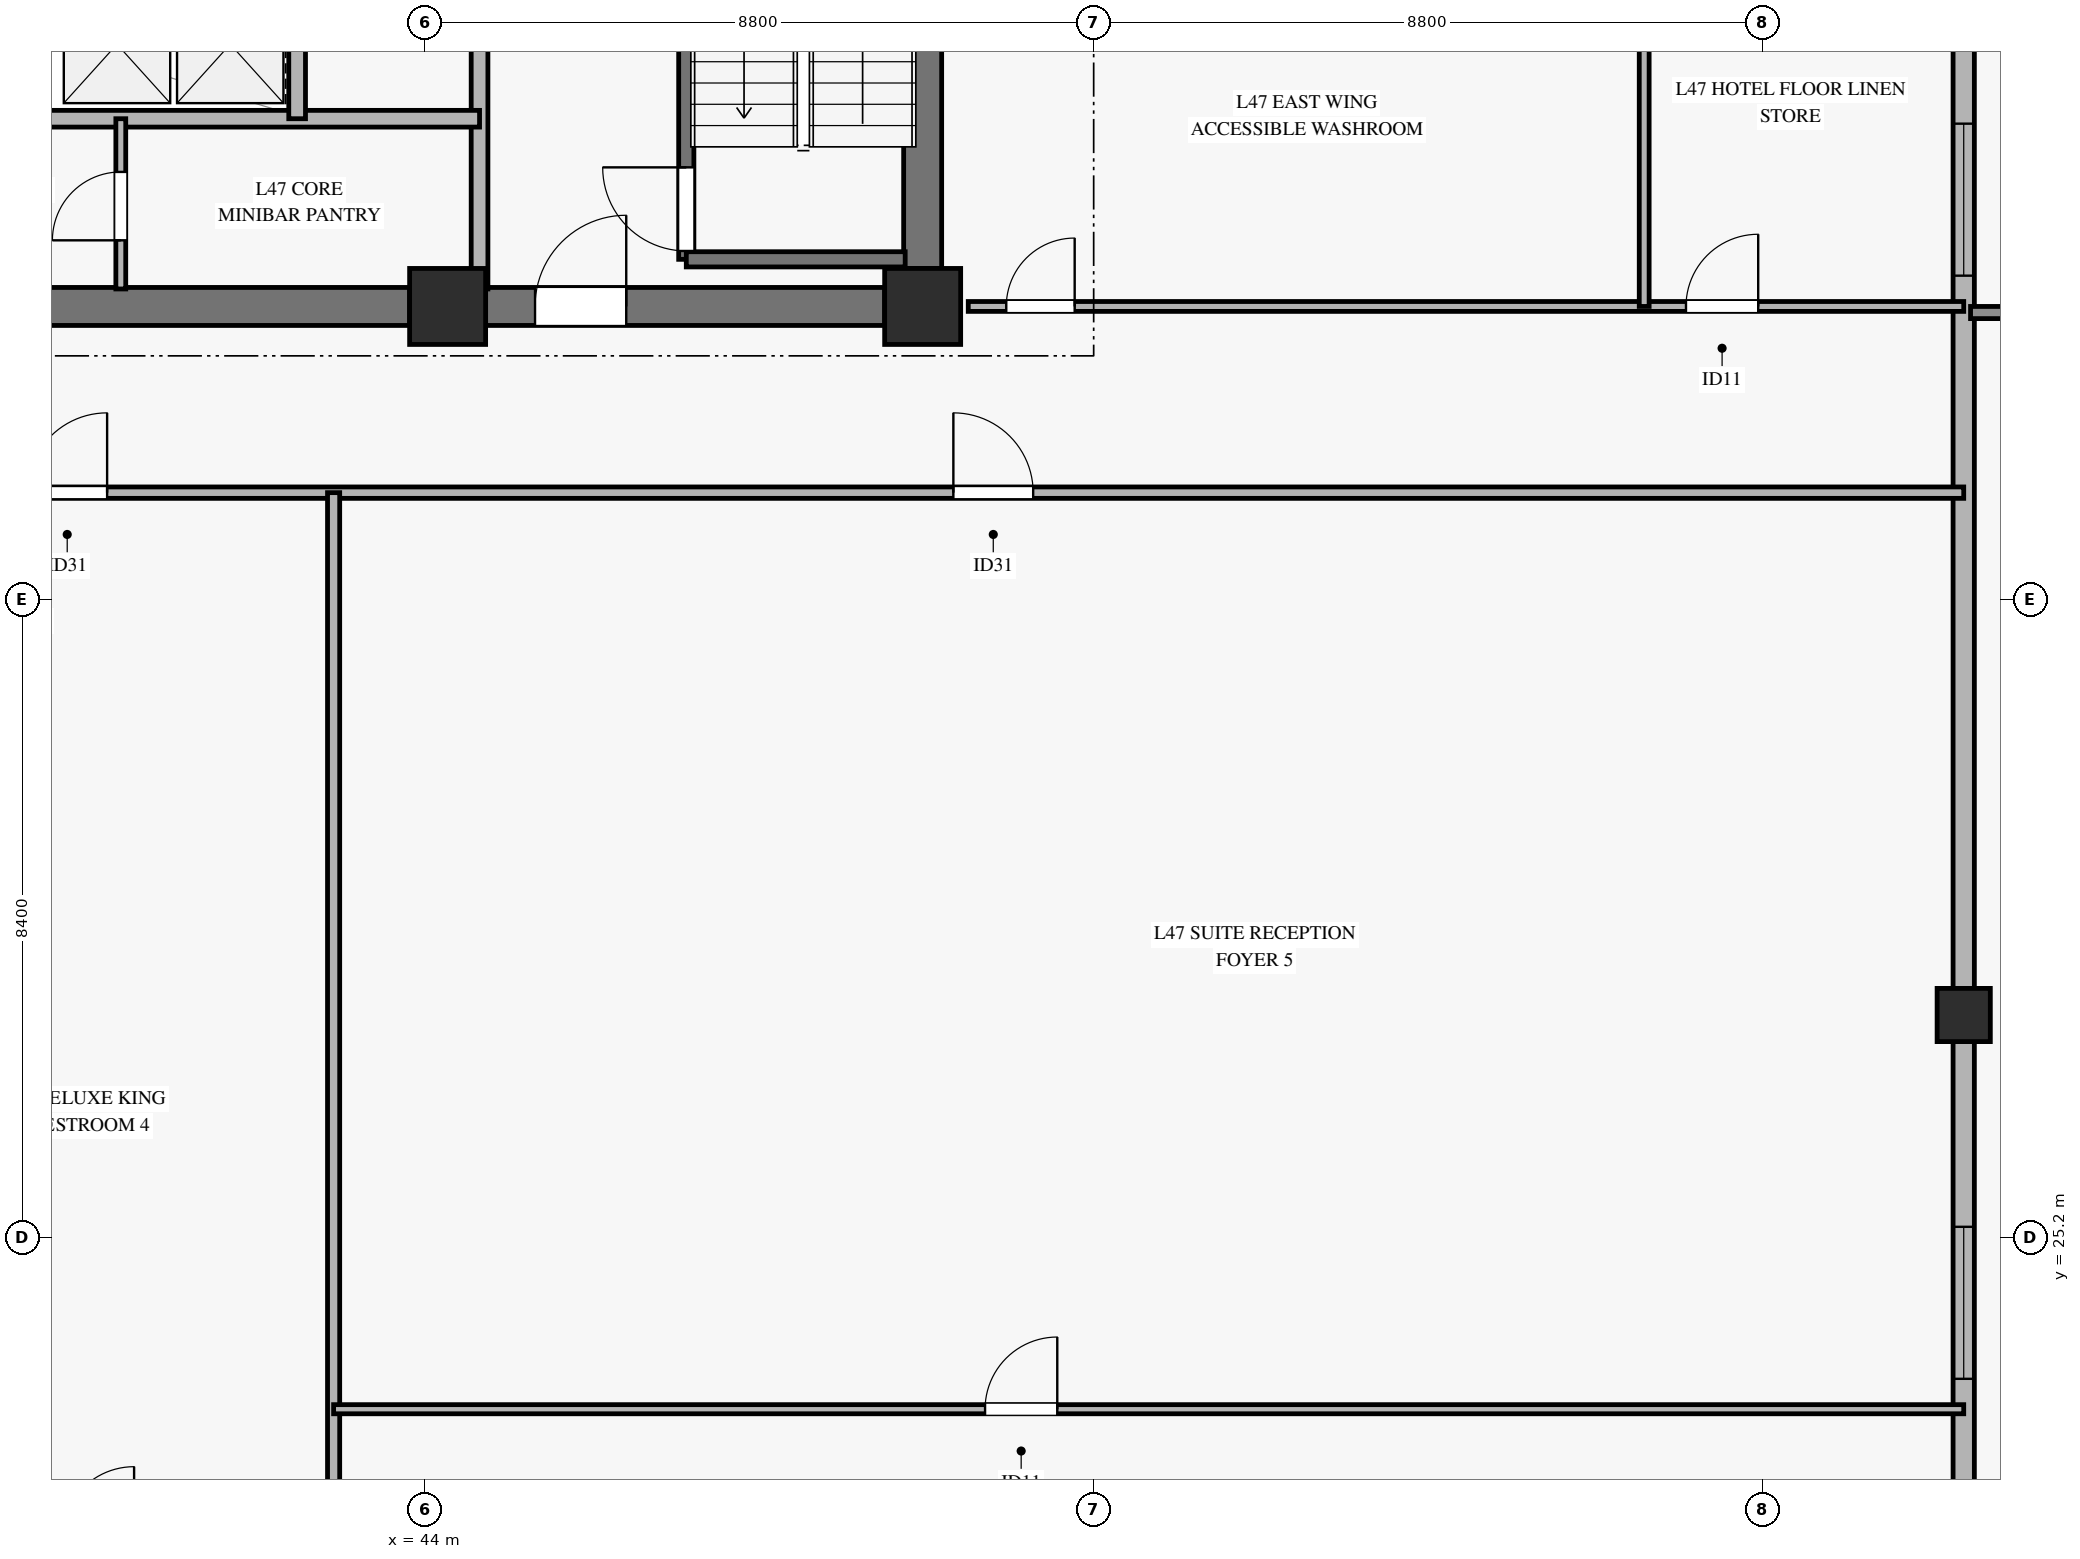
"""IFC4 building model, lengths in metres.
Left out: names, types, materials, properties, quantities, classifications, styles, units other than length and angle.
Written with IfcOpenShell. Run it as: python <this file> out.ifc"""

import sys

from ifc_helpers import new_model, si_unit, direction, frame, frame_2d, origin, origin_2d, place, context, subcontext, project, spatial, rectangle, hollow_rectangle, extrude, source, transform, mapped, element, fill, save


model = new_model("IFC4")
c1 = context("Model", 3, precision=1e-05, world=origin(), true_north=direction((0.0, 1.0)))
c2 = subcontext(c1, "Body", "Model", "MODEL_VIEW")
j1 = project(units=[si_unit("LENGTHUNIT", "METRE"), si_unit("PLANEANGLEUNIT", "RADIAN")], contexts=[c1])
p1 = place(None, origin())
s1 = spatial("IfcSite", under=j1, at=p1, CompositionType="ELEMENT")
p2 = place(p1, origin())
s2 = spatial("IfcBuilding", under=s1, at=p2, CompositionType="ELEMENT")
p3 = place(p2, frame((0.0, 0.0, 187.7)))
s3 = spatial("IfcBuildingStorey", under=s2, at=p3, CompositionType="ELEMENT", Elevation=187.7)
m1 = source(origin(), c2, "Body", "SweptSolid", [
    extrude(rectangle(XDim=1.0, YDim=1.0, at=origin_2d()), origin(), (0.0, 0.0, 1.0), 3.22),
])
for number, where, z_axis, x_axis in (
    (1, (44.3, 37.45, 0.0), (0.0, 0.0, 1.0), (1.0, 0.0, 0.0)),
    (2, (50.55, 37.45, 0.0), (0.0, 0.0, 1.0), (1.0, 0.0, 0.0)),
):
    element("IfcColumn", number, at=place(p3, frame(where, z_axis=z_axis, x_axis=x_axis)), inside=s3, PredefinedType="PILASTER", context=c2, shape_type="MappedRepresentation", body=[
        mapped(m1, transform((0.0, 0.0, 0.0), x_axis=(1.0, 0.0, 0.0), y_axis=(0.0, 1.0, 0.0), z_axis=(0.0, 0.0, 1.0), scale=1.0)),
    ])
p4 = place(p3, frame((36.1, 37.45, 0.0), z_axis=(0.0, 0.0, 1.0), x_axis=(1.0, 0.0, 0.0)))
e3 = element("IfcWall", 3, at=p4, inside=s3, PredefinedType="SHEAR", context=c2, shape_type="SweptSolid", body=[
    extrude(rectangle(XDim=7.7, YDim=0.5, at=frame_2d((3.85, 0.0))), origin(), (0.0, 0.0, 1.0), 3.22),
])
p5 = place(p3, frame((44.8, 37.45, 0.0), z_axis=(0.0, 0.0, 1.0), x_axis=(1.0, 0.0, 0.0)))
e4 = element("IfcWall", 4, at=p5, inside=s3, PredefinedType="SHEAR", context=c2, shape_type="SweptSolid", body=[
    extrude(rectangle(XDim=5.25, YDim=0.5, at=frame_2d((2.625, 0.0))), origin(), (0.0, 0.0, 1.0), 3.22),
])
p6 = place(p5, frame((0.65, 0.0, 0.0)))
e5 = element("IfcOpeningElement", 5, at=p6, cuts=e4, PredefinedType="OPENING", context=c2, shape_type="SweptSolid", body=[
    extrude(rectangle(XDim=1.2, YDim=2.15, at=frame_2d((0.6, 1.075))), frame((0.0, 0.26, 0.0), z_axis=(0.0, -1.0, 0.0), x_axis=(1.0, 0.0, 0.0)), (0.0, 0.0, 1.0), 0.52),
])
p7 = place(p3, frame((50.55, 37.95, 0.0), z_axis=(0.0, 0.0, 1.0), x_axis=(0.0, 1.0, 0.0)))
e6 = element("IfcWall", 6, at=p7, inside=s3, PredefinedType="SHEAR", context=c2, shape_type="SweptSolid", body=[
    extrude(rectangle(XDim=8.1, YDim=0.5, at=frame_2d((4.05, 0.0))), origin(), (0.0, 0.0, 1.0), 3.22),
])
m2 = source(origin(), c2, "Body", "SweptSolid", [
    extrude(hollow_rectangle(XDim=0.7, YDim=0.7, WallThickness=0.032, at=origin_2d()), origin(), (0.0, 0.0, 1.0), 3.239),
])
p8 = place(p3, frame((64.247, 28.127, 0.0), z_axis=(-0.072581223414, 0.081173393164, 0.994053744146), x_axis=(-0.745458506367, -0.666552034941, 0.0)))
e7 = element("IfcColumn", 7, at=p8, inside=s3, PredefinedType="COLUMN", context=c2, shape_type="MappedRepresentation", body=[
    mapped(m2, transform((0.0, 0.0, 0.0), x_axis=(1.0, 0.0, 0.0), y_axis=(0.0, 1.0, 0.0), z_axis=(0.0, 0.0, 1.0), scale=1.0)),
])
p9 = place(p3, frame((64.247, 13.015, 0.0), z_axis=(0.0, 0.0, 1.0), x_axis=(0.0, 1.0, 0.0)))
e8 = element("IfcWall", 8, at=p9, inside=s3, PredefinedType="SOLIDWALL", context=c2, shape_type="SweptSolid", body=[
    extrude(rectangle(XDim=14.762, YDim=0.28, at=frame_2d((7.381, 0.0))), origin(), (0.0, 0.0, 1.0), 2.7),
])
p10 = place(p9, frame((3.078, 0.0, 0.45)))
e9 = element("IfcOpeningElement", 9, at=p10, cuts=e8, PredefinedType="OPENING", context=c2, shape_type="SweptSolid", body=[
    extrude(rectangle(XDim=2.0, YDim=2.0, at=frame_2d((1.0, 1.0))), frame((0.0, 0.15, 0.0), z_axis=(0.0, -1.0, 0.0), x_axis=(1.0, 0.0, 0.0)), (0.0, 0.0, 1.0), 0.3),
])
p11 = place(p9, frame((10.325, 0.0, 0.45)))
e10 = element("IfcOpeningElement", 10, at=p11, cuts=e8, PredefinedType="OPENING", context=c2, shape_type="SweptSolid", body=[
    extrude(rectangle(XDim=2.0, YDim=2.0, at=frame_2d((1.0, 1.0))), frame((0.0, 0.15, 0.0), z_axis=(0.0, -1.0, 0.0), x_axis=(1.0, 0.0, 0.0)), (0.0, 0.0, 1.0), 0.3),
])
p12 = place(p3, frame((64.247, 28.477, 0.0), z_axis=(0.0, 0.0, 1.0), x_axis=(0.0, 1.0, 0.0)))
e11 = element("IfcWall", 11, at=p12, inside=s3, PredefinedType="SOLIDWALL", context=c2, shape_type="SweptSolid", body=[
    extrude(rectangle(XDim=14.762, YDim=0.28, at=frame_2d((7.381, 0.0))), origin(), (0.0, 0.0, 1.0), 2.7),
])
p13 = place(p12, frame((9.378, 0.0, 0.45)))
e12 = element("IfcOpeningElement", 12, at=p13, cuts=e11, PredefinedType="OPENING", context=c2, shape_type="SweptSolid", body=[
    extrude(rectangle(XDim=2.0, YDim=2.0, at=frame_2d((1.0, 1.0))), frame((0.0, 0.15, 0.0), z_axis=(0.0, -1.0, 0.0), x_axis=(1.0, 0.0, 0.0)), (0.0, 0.0, 1.0), 0.3),
])
p14 = place(p3, frame((47.44, 38.07, 0.0), z_axis=(0.0, 0.0, 1.0), x_axis=(0.0, 1.0, 0.0)))
e13 = element("IfcWall", 13, at=p14, inside=s3, PredefinedType="SOLIDWALL", context=c2, shape_type="SweptSolid", body=[
    extrude(rectangle(XDim=7.25, YDim=0.2, at=frame_2d((3.625, 0.0))), origin(), (0.0, 0.0, 1.0), 3.5),
])
p15 = place(p14, frame((0.11, 0.0, 0.0)))
e14 = element("IfcOpeningElement", 14, at=p15, cuts=e13, PredefinedType="OPENING", context=c2, shape_type="SweptSolid", body=[
    extrude(rectangle(XDim=1.1, YDim=2.15, at=frame_2d((0.55, 1.075))), frame((0.0, 0.11, 0.0), z_axis=(0.0, -1.0, 0.0), x_axis=(1.0, 0.0, 0.0)), (0.0, 0.0, 1.0), 0.22),
])
p16 = place(p3, frame((47.44, 38.07, 0.0), z_axis=(0.0, 0.0, 1.0), x_axis=(1.0, 0.0, 0.0)))
e15 = element("IfcWall", 15, at=p16, inside=s3, PredefinedType="SOLIDWALL", context=c2, shape_type="SweptSolid", body=[
    extrude(rectangle(XDim=2.88, YDim=0.2, at=frame_2d((1.44, 0.0))), origin(), (0.0, 0.0, 1.0), 3.5),
])
p17 = place(p3, frame((44.72, 37.68, 0.0), z_axis=(0.0, 0.0, 1.0), x_axis=(0.0, 1.0, 0.0)))
e16 = element("IfcWall", 16, at=p17, inside=s3, PredefinedType="SOLIDWALL", context=c2, shape_type="SweptSolid", body=[
    extrude(rectangle(XDim=7.54, YDim=0.22, at=frame_2d((3.77, 0.0))), origin(), (0.0, 0.0, 1.0), 3.22),
])
p18 = place(p3, frame((36.12, 39.92, 0.0), z_axis=(0.0, 0.0, 1.0), x_axis=(1.0, 0.0, 0.0)))
e17 = element("IfcWall", 17, at=p18, inside=s3, PredefinedType="SOLIDWALL", context=c2, shape_type="SweptSolid", body=[
    extrude(rectangle(XDim=8.6, YDim=0.22, at=frame_2d((4.3, 0.0))), origin(), (0.0, 0.0, 1.0), 2.505),
])
p19 = place(p3, frame((42.32, 39.92, 0.0), z_axis=(0.0, 0.0, 1.0), x_axis=(0.0, 1.0, 0.0)))
e18 = element("IfcWall", 18, at=p19, inside=s3, PredefinedType="SOLIDWALL", context=c2, shape_type="SweptSolid", body=[
    extrude(rectangle(XDim=6.4, YDim=0.22, at=frame_2d((3.2, 0.0))), origin(), (0.0, 0.0, 1.0), 3.22),
])
p20 = place(p3, frame((40.0, 37.68, 0.0), z_axis=(0.0, 0.0, 1.0), x_axis=(0.0, 1.0, 0.0)))
e19 = element("IfcWall", 19, at=p20, inside=s3, PredefinedType="PARTITIONING", context=c2, shape_type="SweptSolid", body=[
    extrude(rectangle(XDim=2.24, YDim=0.13, at=frame_2d((1.12, 0.0))), origin(), (0.0, 0.0, 1.0), 3.22),
])
p21 = place(p20, frame((0.64, 0.0, 0.0)))
e20 = element("IfcOpeningElement", 20, at=p21, cuts=e19, PredefinedType="OPENING", context=c2, shape_type="SweptSolid", body=[
    extrude(rectangle(XDim=0.9, YDim=2.1, at=frame_2d((0.45, 1.05))), frame((0.0, 0.075, 0.0), z_axis=(0.0, -1.0, 0.0), x_axis=(1.0, 0.0, 0.0)), (0.0, 0.0, 1.0), 0.15),
])
p22 = place(p3, frame((6.154, 35.0, 0.0), z_axis=(0.0, 0.0, 1.0), x_axis=(1.0, 0.0, 0.0)))
e21 = element("IfcWall", 21, at=p22, inside=s3, PredefinedType="PARTITIONING", context=c2, shape_type="SweptSolid", body=[
    extrude(rectangle(XDim=58.093, YDim=0.15, at=frame_2d((29.046, 0.0))), origin(), (0.0, 0.0, 1.0), 2.405),
])
p23 = place(p22, frame((6.84, 0.0, 0.0)))
e22 = element("IfcOpeningElement", 22, at=p23, cuts=e21, PredefinedType="OPENING", context=c2, shape_type="SweptSolid", body=[
    extrude(rectangle(XDim=1.05, YDim=2.15, at=frame_2d((0.525, 1.075))), frame((0.0, 0.085, 0.0), z_axis=(0.0, -1.0, 0.0), x_axis=(1.0, 0.0, 0.0)), (0.0, 0.0, 1.0), 0.17),
])
p24 = place(p22, frame((19.523, 0.0, 0.0)))
e23 = element("IfcOpeningElement", 23, at=p24, cuts=e21, PredefinedType="OPENING", context=c2, shape_type="SweptSolid", body=[
    extrude(rectangle(XDim=1.05, YDim=2.15, at=frame_2d((0.525, 1.075))), frame((0.0, 0.085, 0.0), z_axis=(0.0, -1.0, 0.0), x_axis=(1.0, 0.0, 0.0)), (0.0, 0.0, 1.0), 0.17),
])
p25 = place(p22, frame((26.123, 0.0, 0.0)))
e24 = element("IfcOpeningElement", 24, at=p25, cuts=e21, PredefinedType="OPENING", context=c2, shape_type="SweptSolid", body=[
    extrude(rectangle(XDim=1.05, YDim=2.15, at=frame_2d((0.525, 1.075))), frame((0.0, 0.085, 0.0), z_axis=(0.0, -1.0, 0.0), x_axis=(1.0, 0.0, 0.0)), (0.0, 0.0, 1.0), 0.17),
])
p26 = place(p22, frame((32.616, 0.0, 0.0)))
e25 = element("IfcOpeningElement", 25, at=p26, cuts=e21, PredefinedType="OPENING", context=c2, shape_type="SweptSolid", body=[
    extrude(rectangle(XDim=1.05, YDim=2.15, at=frame_2d((0.525, 1.075))), frame((0.0, 0.085, 0.0), z_axis=(0.0, -1.0, 0.0), x_axis=(1.0, 0.0, 0.0)), (0.0, 0.0, 1.0), 0.17),
])
p27 = place(p22, frame((44.8, 0.0, 0.0)))
e26 = element("IfcOpeningElement", 26, at=p27, cuts=e21, PredefinedType="OPENING", context=c2, shape_type="SweptSolid", body=[
    extrude(rectangle(XDim=1.05, YDim=2.15, at=frame_2d((0.525, 1.075))), frame((0.0, 0.085, 0.0), z_axis=(0.0, -1.0, 0.0), x_axis=(1.0, 0.0, 0.0)), (0.0, 0.0, 1.0), 0.17),
])
p28 = place(p3, frame((42.8, 10.154, 0.0), z_axis=(0.0, 0.0, 1.0), x_axis=(0.0, 1.0, 0.0)))
e27 = element("IfcWall", 27, at=p28, inside=s3, PredefinedType="PARTITIONING", context=c2, shape_type="SweptSolid", body=[
    extrude(rectangle(XDim=24.846, YDim=0.16, at=frame_2d((12.423, 0.0))), origin(), (0.0, 0.0, 1.0), 2.705),
])
p29 = place(p3, frame((42.8, 22.94, 0.0), z_axis=(0.0, 0.0, 1.0), x_axis=(1.0, 0.0, 0.0)))
e28 = element("IfcWall", 28, at=p29, inside=s3, PredefinedType="PARTITIONING", context=c2, shape_type="SweptSolid", body=[
    extrude(rectangle(XDim=21.447, YDim=0.12, at=frame_2d((10.724, 0.0))), origin(), (0.0, 0.0, 1.0), 2.405),
])
p30 = place(p29, frame((8.571, 0.0, 0.0)))
e29 = element("IfcOpeningElement", 29, at=p30, cuts=e28, PredefinedType="OPENING", context=c2, shape_type="SweptSolid", body=[
    extrude(rectangle(XDim=0.95, YDim=2.1, at=frame_2d((0.475, 1.05))), frame((0.0, 0.07, 0.0), z_axis=(0.0, -1.0, 0.0), x_axis=(1.0, 0.0, 0.0)), (0.0, 0.0, 1.0), 0.14),
])
p31 = place(p3, frame((51.15, 37.45, 0.0), z_axis=(0.0, 0.0, 1.0), x_axis=(1.0, 0.0, 0.0)))
e30 = element("IfcWall", 30, at=p31, inside=s3, PredefinedType="PARTITIONING", context=c2, shape_type="SweptSolid", body=[
    extrude(rectangle(XDim=13.097, YDim=0.13, at=frame_2d((6.549, 0.0))), origin(), (0.0, 0.0, 1.0), 2.705),
])
p32 = place(p31, frame((0.5, 0.0, 0.0)))
e31 = element("IfcOpeningElement", 31, at=p32, cuts=e30, PredefinedType="OPENING", context=c2, shape_type="SweptSolid", body=[
    extrude(rectangle(XDim=0.9, YDim=2.1, at=frame_2d((0.45, 1.05))), frame((0.0, 0.075, 0.0), z_axis=(0.0, -1.0, 0.0), x_axis=(1.0, 0.0, 0.0)), (0.0, 0.0, 1.0), 0.15),
])
p33 = place(p31, frame((9.443, 0.0, 0.0)))
e32 = element("IfcOpeningElement", 32, at=p33, cuts=e30, PredefinedType="OPENING", context=c2, shape_type="SweptSolid", body=[
    extrude(rectangle(XDim=0.95, YDim=2.1, at=frame_2d((0.475, 1.05))), frame((0.0, 0.075, 0.0), z_axis=(0.0, -1.0, 0.0), x_axis=(1.0, 0.0, 0.0)), (0.0, 0.0, 1.0), 0.15),
])
p34 = place(p3, frame((60.043, 37.45, 0.0), z_axis=(0.0, 0.0, 1.0), x_axis=(0.0, 1.0, 0.0)))
e33 = element("IfcWall", 33, at=p34, inside=s3, PredefinedType="PARTITIONING", context=c2, shape_type="SweptSolid", body=[
    extrude(rectangle(XDim=8.8, YDim=0.13, at=frame_2d((4.4, 0.0))), origin(), (0.0, 0.0, 1.0), 2.705),
])
m3 = source(origin(), c2, "Body", "SweptSolid", [
    extrude(rectangle(XDim=2.0, YDim=2.0, at=frame_2d((1.0, 1.0))), frame((0.0, 0.03, 0.0), z_axis=(0.0, -1.0, 0.0), x_axis=(1.0, 0.0, 0.0)), (0.0, 0.0, 1.0), 0.06),
])
p35 = place(p11, origin())
e34 = element("IfcWindow", 34, at=p35, inside=s3, PartitioningType="SINGLE_PANEL", PredefinedType="WINDOW", context=c2, shape_type="MappedRepresentation", body=[
    mapped(m3, transform((0.0, 0.0, 0.0), x_axis=(1.0, 0.0, 0.0), y_axis=(0.0, 1.0, 0.0), z_axis=(0.0, 0.0, 1.0), scale=1.0)),
])
fill(e10, e34)
p36 = place(p13, origin())
e35 = element("IfcWindow", 35, at=p36, inside=s3, PartitioningType="SINGLE_PANEL", PredefinedType="WINDOW", context=c2, shape_type="MappedRepresentation", body=[
    mapped(m3, transform((0.0, 0.0, 0.0), x_axis=(1.0, 0.0, 0.0), y_axis=(0.0, 1.0, 0.0), z_axis=(0.0, 0.0, 1.0), scale=1.0)),
])
fill(e12, e35)
m4 = source(origin(), c2, "Body", "SweptSolid", [
    extrude(rectangle(XDim=1.1, YDim=2.15, at=frame_2d((0.55, 1.075))), frame((0.0, 0.025, 0.0), z_axis=(0.0, -1.0, 0.0), x_axis=(1.0, 0.0, 0.0)), (0.0, 0.0, 1.0), 0.05),
])
p37 = place(p15, origin())
e36 = element("IfcDoor", 36, at=p37, inside=s3, OperationType="SINGLE_SWING_RIGHT", PredefinedType="DOOR", context=c2, shape_type="MappedRepresentation", body=[
    mapped(m4, transform((0.0, 0.0, 0.0), x_axis=(1.0, 0.0, 0.0), y_axis=(0.0, 1.0, 0.0), z_axis=(0.0, 0.0, 1.0), scale=1.0)),
])
fill(e14, e36)
m5 = source(origin(), c2, "Body", "SweptSolid", [
    extrude(rectangle(XDim=1.2, YDim=2.15, at=frame_2d((0.6, 1.075))), frame((0.0, 0.025, 0.0), z_axis=(0.0, -1.0, 0.0), x_axis=(1.0, 0.0, 0.0)), (0.0, 0.0, 1.0), 0.05),
])
p38 = place(p6, origin())
e37 = element("IfcDoor", 37, at=p38, inside=s3, OperationType="SINGLE_SWING_RIGHT", PredefinedType="DOOR", context=c2, shape_type="MappedRepresentation", body=[
    mapped(m5, transform((0.0, 0.0, 0.0), x_axis=(1.0, 0.0, 0.0), y_axis=(0.0, 1.0, 0.0), z_axis=(0.0, 0.0, 1.0), scale=1.0)),
])
fill(e5, e37)
m6 = source(origin(), c2, "Body", "SweptSolid", [
    extrude(rectangle(XDim=0.9, YDim=2.1, at=frame_2d((0.45, 1.05))), frame((0.0, 0.025, 0.0), z_axis=(0.0, -1.0, 0.0), x_axis=(1.0, 0.0, 0.0)), (0.0, 0.0, 1.0), 0.05),
])
p39 = place(p21, origin())
e38 = element("IfcDoor", 38, at=p39, inside=s3, OperationType="SINGLE_SWING_LEFT", PredefinedType="DOOR", context=c2, shape_type="MappedRepresentation", body=[
    mapped(m6, transform((0.0, 0.0, 0.0), x_axis=(1.0, 0.0, 0.0), y_axis=(0.0, 1.0, 0.0), z_axis=(0.0, 0.0, 1.0), scale=1.0)),
])
fill(e20, e38)
m7 = source(origin(), c2, "Body", "SweptSolid", [
    extrude(rectangle(XDim=1.05, YDim=2.15, at=frame_2d((0.525, 1.075))), frame((0.0, 0.025, 0.0), z_axis=(0.0, -1.0, 0.0), x_axis=(1.0, 0.0, 0.0)), (0.0, 0.0, 1.0), 0.05),
])
p40 = place(p26, origin())
e39 = element("IfcDoor", 39, at=p40, inside=s3, OperationType="SINGLE_SWING_RIGHT", PredefinedType="DOOR", context=c2, shape_type="MappedRepresentation", body=[
    mapped(m7, transform((0.0, 0.0, 0.0), x_axis=(1.0, 0.0, 0.0), y_axis=(0.0, 1.0, 0.0), z_axis=(0.0, 0.0, 1.0), scale=1.0)),
])
fill(e25, e39)
p41 = place(p27, origin())
e40 = element("IfcDoor", 40, at=p41, inside=s3, OperationType="SINGLE_SWING_LEFT", PredefinedType="DOOR", context=c2, shape_type="MappedRepresentation", body=[
    mapped(m7, transform((0.0, 0.0, 0.0), x_axis=(1.0, 0.0, 0.0), y_axis=(0.0, 1.0, 0.0), z_axis=(0.0, 0.0, 1.0), scale=1.0)),
])
fill(e26, e40)
m8 = source(origin(), c2, "Body", "SweptSolid", [
    extrude(rectangle(XDim=0.95, YDim=2.1, at=frame_2d((0.475, 1.05))), frame((0.0, 0.025, 0.0), z_axis=(0.0, -1.0, 0.0), x_axis=(1.0, 0.0, 0.0)), (0.0, 0.0, 1.0), 0.05),
])
p42 = place(p30, origin())
e41 = element("IfcDoor", 41, at=p42, inside=s3, OperationType="SINGLE_SWING_RIGHT", PredefinedType="DOOR", context=c2, shape_type="MappedRepresentation", body=[
    mapped(m8, transform((0.0, 0.0, 0.0), x_axis=(1.0, 0.0, 0.0), y_axis=(0.0, 1.0, 0.0), z_axis=(0.0, 0.0, 1.0), scale=1.0)),
])
fill(e29, e41)
p43 = place(p32, origin())
e42 = element("IfcDoor", 42, at=p43, inside=s3, OperationType="SINGLE_SWING_RIGHT", PredefinedType="DOOR", context=c2, shape_type="MappedRepresentation", body=[
    mapped(m6, transform((0.0, 0.0, 0.0), x_axis=(1.0, 0.0, 0.0), y_axis=(0.0, 1.0, 0.0), z_axis=(0.0, 0.0, 1.0), scale=1.0)),
])
fill(e31, e42)
p44 = place(p33, origin())
e43 = element("IfcDoor", 43, at=p44, inside=s3, OperationType="SINGLE_SWING_RIGHT", PredefinedType="DOOR", context=c2, shape_type="MappedRepresentation", body=[
    mapped(m8, transform((0.0, 0.0, 0.0), x_axis=(1.0, 0.0, 0.0), y_axis=(0.0, 1.0, 0.0), z_axis=(0.0, 0.0, 1.0), scale=1.0)),
])
fill(e32, e43)
save(model, sys.argv[1])
